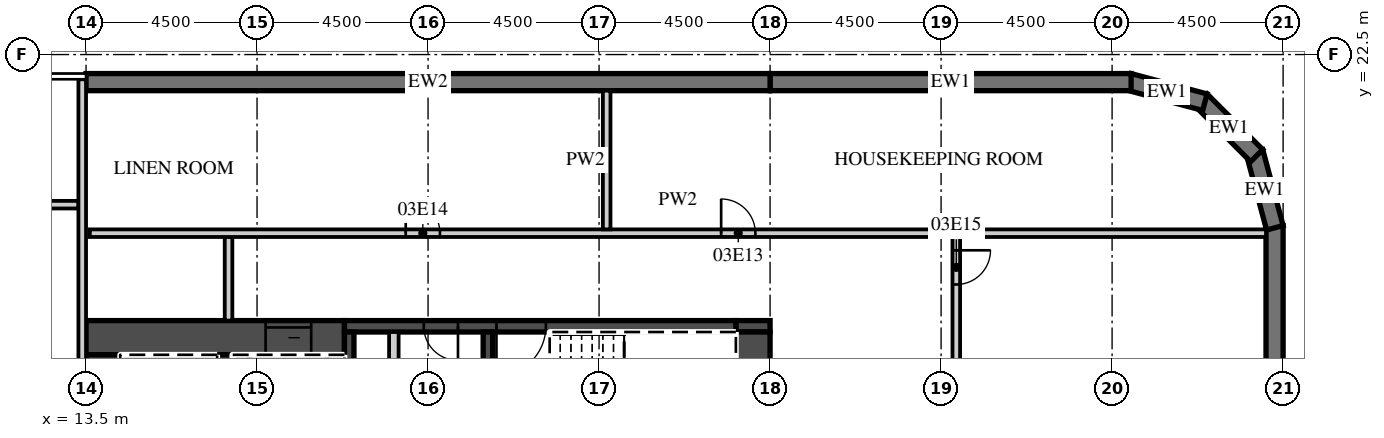
"""IFC4 building model, lengths in metres.
Left out: names, types, materials, properties, quantities, classifications, styles, units other than length and angle.
Written with IfcOpenShell. Run it as: python <this file> out.ifc"""

import sys

from ifc_helpers import new_model, si_unit, direction, frame, frame_2d, origin, place, context, subcontext, project, spatial, polyline, rectangle, outline, extrude, element, fill, save


model = new_model("IFC4")
c1 = context("Model", 3, precision=1e-05, world=origin(), true_north=direction((0.0, 1.0)))
c2 = subcontext(c1, "Body", "Model", "MODEL_VIEW")
j1 = project(units=[si_unit("LENGTHUNIT", "METRE"), si_unit("PLANEANGLEUNIT", "RADIAN")], contexts=[c1])
p1 = place(None, origin())
s1 = spatial("IfcSite", under=j1, at=p1, CompositionType="ELEMENT")
p2 = place(p1, origin())
s2 = spatial("IfcBuilding", under=s1, at=p2, CompositionType="ELEMENT")
p3 = place(p2, frame((0.0, 0.0, 23.5)))
s3 = spatial("IfcBuildingStorey", under=s2, at=p3, CompositionType="ELEMENT", Elevation=23.5)
p4 = place(p3, frame((44.775, -18.0, 0.0), z_axis=(0.0, 0.0, 1.0), x_axis=(0.0, 1.0, 0.0)))
e1 = element("IfcWall", 1, at=p4, inside=s3, PredefinedType="SOLIDWALL", context=c2, shape_type="SweptSolid", body=[
    extrude(rectangle(XDim=36.0, YDim=0.45, at=frame_2d((18.0, 0.0))), origin(), (0.0, 0.0, 1.0), 5.05),
])
p5 = place(p4, frame((4.05, 0.0, 0.9)))
e2 = element("IfcOpeningElement", 2, at=p5, cuts=e1, PredefinedType="OPENING", context=c2, shape_type="SweptSolid", body=[
    extrude(rectangle(XDim=3.0, YDim=1.8, at=frame_2d((1.5, 0.9))), frame((0.0, 0.235, 0.0), z_axis=(0.0, -1.0, 0.0), x_axis=(1.0, 0.0, 0.0)), (0.0, 0.0, 1.0), 0.47),
])
p6 = place(p3, frame((44.783, 17.942, 0.0), z_axis=(0.0, 0.0, 1.0), x_axis=(-0.25881466832, 0.965926999034, 0.0)))
e3 = element("IfcWall", 3, at=p6, inside=s3, PredefinedType="SOLIDWALL", context=c2, shape_type="SweptSolid", body=[
    extrude(outline(polyline([(0.0, -0.225), (2.071, -0.225), (1.95, 0.225), (0.121, 0.225), (0.0, -0.225)])), origin(), (0.0, 0.0, 1.0), 5.05),
])
p7 = place(p3, frame((44.305, 19.841, 0.0), z_axis=(0.0, 0.0, 1.0), x_axis=(-0.707106781187, 0.707106781187, 0.0)))
e4 = element("IfcWall", 4, at=p7, inside=s3, PredefinedType="SOLIDWALL", context=c2, shape_type="SweptSolid", body=[
    extrude(outline(polyline([(0.0, -0.225), (2.071, -0.225), (1.95, 0.225), (0.121, 0.225), (0.0, -0.225)])), origin(), (0.0, 0.0, 1.0), 5.05),
])
p8 = place(p3, frame((42.942, 21.247, 0.0), z_axis=(0.0, 0.0, 1.0), x_axis=(-0.965926999034, 0.25881466832, 0.0)))
e5 = element("IfcWall", 5, at=p8, inside=s3, PredefinedType="SOLIDWALL", context=c2, shape_type="SweptSolid", body=[
    extrude(outline(polyline([(-0.0, -0.225), (2.07, -0.225), (1.95, 0.225), (0.12, 0.225), (-0.0, -0.225)])), origin(), (0.0, 0.0, 1.0), 5.05),
])
p9 = place(p3, frame((41.0, 21.775, 0.0), z_axis=(0.0, 0.0, 1.0), x_axis=(-1.0, 0.0, 0.0)))
e6 = element("IfcWall", 6, at=p9, inside=s3, PredefinedType="SOLIDWALL", context=c2, shape_type="SweptSolid", body=[
    extrude(rectangle(XDim=9.5, YDim=0.45, at=frame_2d((4.75, 0.0))), origin(), (0.0, 0.0, 1.0), 5.05),
])
p10 = place(p3, frame((31.5, 21.775, 0.0), z_axis=(0.0, 0.0, 1.0), x_axis=(-1.0, 0.0, 0.0)))
e7 = element("IfcWall", 7, at=p10, inside=s3, PredefinedType="SOLIDWALL", context=c2, shape_type="SweptSolid", body=[
    extrude(rectangle(XDim=18.0, YDim=0.45, at=frame_2d((9.0, 0.0))), origin(), (0.0, 0.0, 1.0), 5.05),
])
p11 = place(p3, frame((13.5, 15.05, 0.0), z_axis=(0.0, 0.0, 1.0), x_axis=(1.0, 0.0, 0.0)))
e8 = element("IfcWall", 8, at=p11, inside=s3, PredefinedType="SHEAR", context=c2, shape_type="SweptSolid", body=[
    extrude(rectangle(XDim=6.8, YDim=0.9, at=frame_2d((3.4, 0.0))), origin(), (0.0, 0.0, 1.0), 5.05),
])
p12 = place(p11, frame((4.725, 0.0, 0.0)))
e9 = element("IfcOpeningElement", 9, at=p12, cuts=e8, PredefinedType="OPENING", context=c2, shape_type="SweptSolid", body=[
    extrude(rectangle(XDim=1.2, YDim=2.1, at=frame_2d((0.6, 1.05))), frame((0.0, 0.46, 0.0), z_axis=(0.0, -1.0, 0.0), x_axis=(1.0, 0.0, 0.0)), (0.0, 0.0, 1.0), 0.92),
])
p13 = place(p3, frame((30.6, 15.35, 0.0), z_axis=(0.0, 0.0, 1.0), x_axis=(1.0, 0.0, 0.0)))
e10 = element("IfcWall", 10, at=p13, inside=s3, PredefinedType="SHEAR", context=c2, shape_type="SweptSolid", body=[
    extrude(rectangle(XDim=0.9, YDim=0.3, at=frame_2d((0.45, 0.0))), origin(), (0.0, 0.0, 1.0), 5.05),
])
p14 = place(p3, frame((20.3, 15.35, 0.0), z_axis=(0.0, 0.0, 1.0), x_axis=(1.0, 0.0, 0.0)))
e11 = element("IfcWall", 11, at=p14, inside=s3, PredefinedType="SHEAR", context=c2, shape_type="SweptSolid", body=[
    extrude(rectangle(XDim=10.3, YDim=0.3, at=frame_2d((5.15, 0.0))), origin(), (0.0, 0.0, 1.0), 5.05),
])
p15 = place(p14, frame((4.0, 0.0, 0.0)))
e12 = element("IfcOpeningElement", 12, at=p15, cuts=e11, PredefinedType="OPENING", context=c2, shape_type="SweptSolid", body=[
    extrude(rectangle(XDim=1.3, YDim=2.1, at=frame_2d((0.65, 1.05))), frame((0.0, 0.16, 0.0), z_axis=(0.0, -1.0, 0.0), x_axis=(1.0, 0.0, 0.0)), (0.0, 0.0, 1.0), 0.32),
])
p16 = place(p14, frame((2.087, 0.0, 0.0)))
e13 = element("IfcOpeningElement", 13, at=p16, cuts=e11, PredefinedType="OPENING", context=c2, shape_type="SweptSolid", body=[
    extrude(rectangle(XDim=0.9, YDim=2.1, at=frame_2d((0.45, 1.05))), frame((0.0, 0.16, 0.0), z_axis=(0.0, -1.0, 0.0), x_axis=(1.0, 0.0, 0.0)), (0.0, 0.0, 1.0), 0.32),
])
p17 = place(p3, frame((31.05, 2.4, 0.0), z_axis=(0.0, 0.0, 1.0), x_axis=(0.0, 1.0, 0.0)))
e14 = element("IfcWall", 14, at=p17, inside=s3, PredefinedType="SHEAR", context=c2, shape_type="SweptSolid", body=[
    extrude(rectangle(XDim=12.8, YDim=0.9, at=frame_2d((6.4, 0.0))), origin(), (0.0, 0.0, 1.0), 5.05),
])
p18 = place(p17, frame((0.2, 0.0, 0.0)))
e15 = element("IfcOpeningElement", 15, at=p18, cuts=e14, PredefinedType="OPENING", context=c2, shape_type="SweptSolid", body=[
    extrude(rectangle(XDim=1.1, YDim=2.1, at=frame_2d((0.55, 1.05))), frame((0.0, 0.46, 0.0), z_axis=(0.0, -1.0, 0.0), x_axis=(1.0, 0.0, 0.0)), (0.0, 0.0, 1.0), 0.92),
])
p19 = place(p3, frame((13.95, 2.4, 0.0), z_axis=(0.0, 0.0, 1.0), x_axis=(0.0, 1.0, 0.0)))
e16 = element("IfcWall", 16, at=p19, inside=s3, PredefinedType="SHEAR", context=c2, shape_type="SweptSolid", body=[
    extrude(rectangle(XDim=12.2, YDim=0.9, at=frame_2d((6.1, 0.0))), origin(), (0.0, 0.0, 1.0), 5.05),
])
p20 = place(p3, frame((17.15, 8.8, 0.0), z_axis=(0.0, 0.0, 1.0), x_axis=(0.0, 1.0, 0.0)))
e17 = element("IfcWall", 17, at=p20, inside=s3, PredefinedType="SHEAR", context=c2, shape_type="SweptSolid", body=[
    extrude(rectangle(XDim=5.8, YDim=0.4, at=frame_2d((2.9, 0.0))), origin(), (0.0, 0.0, 1.0), 5.05),
])
for number, where, z_axis, x_axis in (
    (18, (20.425, 11.95, 0.0), (0.0, 0.0, 1.0), (0.0, 1.0, 0.0)),
    (19, (24.075, 11.95, 0.0), (0.0, 0.0, 1.0), (0.0, 1.0, 0.0)),
):
    element("IfcWall", number, at=place(p3, frame(where, z_axis=z_axis, x_axis=x_axis)), inside=s3, PredefinedType="SHEAR", context=c2, shape_type="SweptSolid", body=[
        extrude(rectangle(XDim=3.25, YDim=0.25, at=frame_2d((1.625, 0.0))), origin(), (0.0, 0.0, 1.0), 5.05),
    ])
p21 = place(p3, frame((21.6, 11.95, 0.0), z_axis=(0.0, 0.0, 1.0), x_axis=(0.0, 1.0, 0.0)))
e20 = element("IfcWall", 20, at=p21, inside=s3, PredefinedType="PARTITIONING", context=c2, shape_type="SweptSolid", body=[
    extrude(rectangle(XDim=3.25, YDim=0.25, at=frame_2d((1.625, 0.0))), origin(), (0.0, 0.0, 1.0), 5.05),
])
p22 = place(p3, frame((17.25, 15.5, 0.0), z_axis=(0.0, 0.0, 1.0), x_axis=(0.0, 1.0, 0.0)))
e21 = element("IfcWall", 21, at=p22, inside=s3, PredefinedType="PARTITIONING", context=c2, shape_type="SweptSolid", body=[
    extrude(rectangle(XDim=2.2, YDim=0.2, at=frame_2d((1.1, 0.0))), origin(), (0.0, 0.0, 1.0), 5.05),
])
p23 = place(p3, frame((36.4, 1.75, 0.0), z_axis=(0.0, 0.0, 1.0), x_axis=(0.0, 1.0, 0.0)))
e22 = element("IfcWall", 22, at=p23, inside=s3, PredefinedType="PARTITIONING", context=c2, shape_type="SweptSolid", body=[
    extrude(rectangle(XDim=15.95, YDim=0.2, at=frame_2d((7.975, 0.0))), origin(), (0.0, 0.0, 1.0), 5.05),
])
p24 = place(p23, frame((14.7, 0.0, 0.0)))
e23 = element("IfcOpeningElement", 23, at=p24, cuts=e22, PredefinedType="OPENING", context=c2, shape_type="SweptSolid", body=[
    extrude(rectangle(XDim=0.9, YDim=2.1, at=frame_2d((0.45, 1.05))), frame((0.0, 0.11, 0.0), z_axis=(0.0, -1.0, 0.0), x_axis=(1.0, 0.0, 0.0)), (0.0, 0.0, 1.0), 0.22),
])
p25 = place(p3, frame((13.6, 17.8, 0.0), z_axis=(0.0, 0.0, 1.0), x_axis=(1.0, 0.0, 0.0)))
e24 = element("IfcWall", 24, at=p25, inside=s3, PredefinedType="PARTITIONING", context=c2, shape_type="SweptSolid", body=[
    extrude(rectangle(XDim=30.95, YDim=0.2, at=frame_2d((15.475, 0.0))), origin(), (0.0, 0.0, 1.0), 5.05),
])
p26 = place(p25, frame((16.613, 0.0, 0.0)))
e25 = element("IfcOpeningElement", 25, at=p26, cuts=e24, PredefinedType="OPENING", context=c2, shape_type="SweptSolid", body=[
    extrude(rectangle(XDim=0.9, YDim=2.1, at=frame_2d((0.45, 1.05))), frame((0.0, 0.11, 0.0), z_axis=(0.0, -1.0, 0.0), x_axis=(1.0, 0.0, 0.0)), (0.0, 0.0, 1.0), 0.22),
])
p27 = place(p25, frame((8.312, 0.0, 0.0)))
e26 = element("IfcOpeningElement", 26, at=p27, cuts=e24, PredefinedType="OPENING", context=c2, shape_type="SweptSolid", body=[
    extrude(rectangle(XDim=0.9, YDim=2.1, at=frame_2d((0.45, 1.05))), frame((0.0, 0.11, 0.0), z_axis=(0.0, -1.0, 0.0), x_axis=(1.0, 0.0, 0.0)), (0.0, 0.0, 1.0), 0.22),
])
p28 = place(p3, frame((27.2, 17.9, 0.0), z_axis=(0.0, 0.0, 1.0), x_axis=(0.0, 1.0, 0.0)))
e27 = element("IfcWall", 27, at=p28, inside=s3, PredefinedType="PARTITIONING", context=c2, shape_type="SweptSolid", body=[
    extrude(rectangle(XDim=3.65, YDim=0.2, at=frame_2d((1.825, 0.0))), origin(), (0.0, 0.0, 1.0), 5.05),
])
p29 = place(p3, frame((4.6, 18.55, 0.0), z_axis=(0.0, 0.0, 1.0), x_axis=(1.0, 0.0, 0.0)))
e28 = element("IfcWall", 28, at=p29, inside=s3, PredefinedType="PARTITIONING", context=c2, shape_type="SweptSolid", body=[
    extrude(rectangle(XDim=8.7, YDim=0.2, at=frame_2d((4.35, 0.0))), origin(), (0.0, 0.0, 1.0), 5.05),
])
p30 = place(p29, frame((6.45, 0.0, 0.0)))
e29 = element("IfcOpeningElement", 29, at=p30, cuts=e28, PredefinedType="OPENING", context=c2, shape_type="SweptSolid", body=[
    extrude(rectangle(XDim=0.9, YDim=2.1, at=frame_2d((0.45, 1.05))), frame((0.0, 0.11, 0.0), z_axis=(0.0, -1.0, 0.0), x_axis=(1.0, 0.0, 0.0)), (0.0, 0.0, 1.0), 0.22),
])
p31 = place(p3, frame((13.4, 1.7, 0.0), z_axis=(0.0, 0.0, 1.0), x_axis=(0.0, 1.0, 0.0)))
e30 = element("IfcWall", 30, at=p31, inside=s3, PredefinedType="PARTITIONING", context=c2, shape_type="SweptSolid", body=[
    extrude(rectangle(XDim=20.15, YDim=0.2, at=frame_2d((10.075, 0.0))), origin(), (0.0, 0.0, 1.0), 5.05),
])
p32 = place(p12, origin())
e31 = element("IfcDoor", 31, at=p32, inside=s3, OperationType="SLIDING_TO_LEFT", PredefinedType="DOOR", context=c2, shape_type="SweptSolid", body=[
    extrude(rectangle(XDim=1.2, YDim=2.1, at=frame_2d((0.6, 1.05))), frame((0.0, 0.025, 0.0), z_axis=(0.0, -1.0, 0.0), x_axis=(1.0, 0.0, 0.0)), (0.0, 0.0, 1.0), 0.05),
])
fill(e9, e31)
p33 = place(p15, origin())
e32 = element("IfcDoor", 32, at=p33, inside=s3, OperationType="SINGLE_SWING_LEFT", PredefinedType="DOOR", context=c2, shape_type="SweptSolid", body=[
    extrude(rectangle(XDim=1.3, YDim=2.1, at=frame_2d((0.65, 1.05))), frame((0.0, 0.025, 0.0), z_axis=(0.0, -1.0, 0.0), x_axis=(1.0, 0.0, 0.0)), (0.0, 0.0, 1.0), 0.05),
])
fill(e12, e32)
p34 = place(p16, origin())
e33 = element("IfcDoor", 33, at=p34, inside=s3, OperationType="SINGLE_SWING_RIGHT", PredefinedType="DOOR", context=c2, shape_type="SweptSolid", body=[
    extrude(rectangle(XDim=0.9, YDim=2.1, at=frame_2d((0.45, 1.05))), frame((0.0, 0.025, 0.0), z_axis=(0.0, -1.0, 0.0), x_axis=(1.0, 0.0, 0.0)), (0.0, 0.0, 1.0), 0.05),
])
fill(e13, e33)
p35 = place(p26, origin())
e34 = element("IfcDoor", 34, at=p35, inside=s3, OperationType="SINGLE_SWING_LEFT", PredefinedType="DOOR", context=c2, shape_type="SweptSolid", body=[
    extrude(rectangle(XDim=0.9, YDim=2.1, at=frame_2d((0.45, 1.05))), frame((0.0, 0.025, 0.0), z_axis=(0.0, -1.0, 0.0), x_axis=(1.0, 0.0, 0.0)), (0.0, 0.0, 1.0), 0.05),
])
fill(e25, e34)
p36 = place(p27, origin())
e35 = element("IfcDoor", 35, at=p36, inside=s3, OperationType="SINGLE_SWING_LEFT", PredefinedType="DOOR", context=c2, shape_type="SweptSolid", body=[
    extrude(rectangle(XDim=0.9, YDim=2.1, at=frame_2d((0.45, 1.05))), frame((0.0, 0.025, 0.0), z_axis=(0.0, -1.0, 0.0), x_axis=(1.0, 0.0, 0.0)), (0.0, 0.0, 1.0), 0.05),
])
fill(e26, e35)
p37 = place(p24, origin())
e36 = element("IfcDoor", 36, at=p37, inside=s3, OperationType="SINGLE_SWING_RIGHT", PredefinedType="DOOR", context=c2, shape_type="SweptSolid", body=[
    extrude(rectangle(XDim=0.9, YDim=2.1, at=frame_2d((0.45, 1.05))), frame((0.0, 0.025, 0.0), z_axis=(0.0, -1.0, 0.0), x_axis=(1.0, 0.0, 0.0)), (0.0, 0.0, 1.0), 0.05),
])
fill(e23, e36)
save(model, sys.argv[1])
